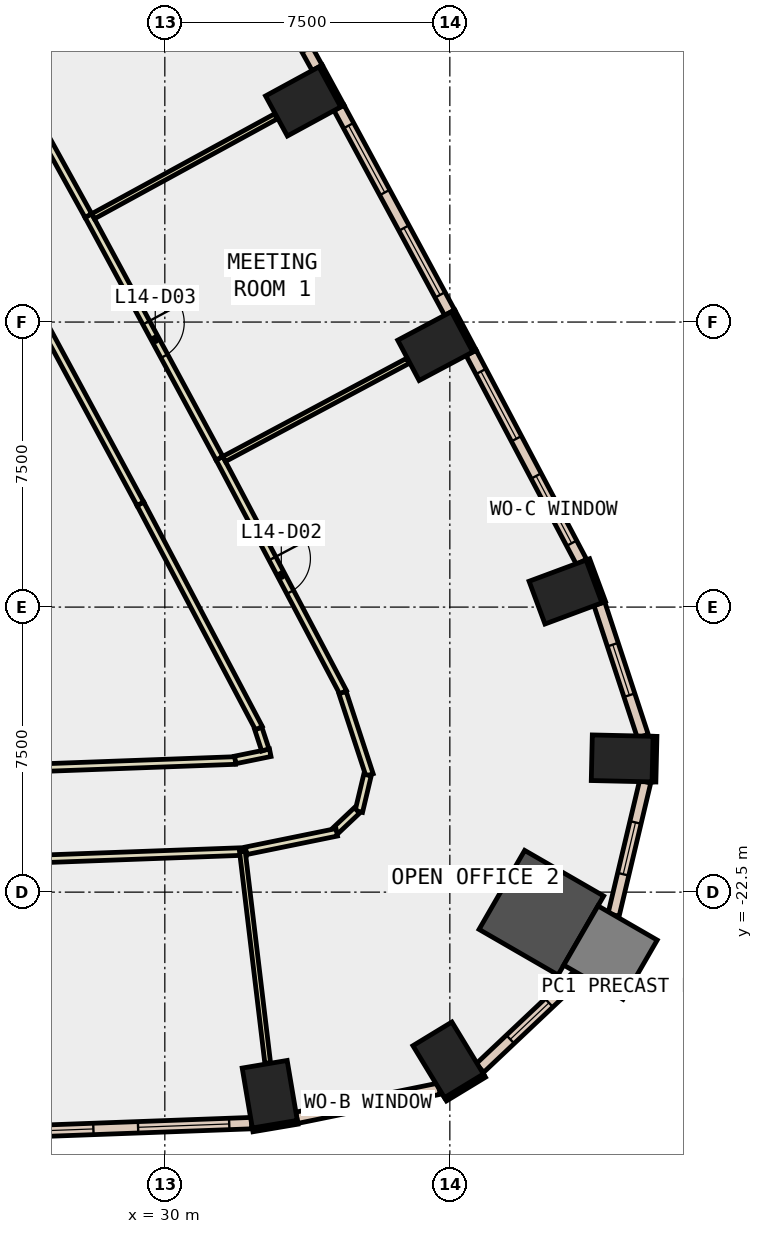
"""IFC4 building model, lengths in metres.
Left out: names, types, materials, properties, quantities, classifications, styles, units other than length and angle.
Written with IfcOpenShell. Run it as: python <this file> out.ifc"""

import sys

from ifc_helpers import new_model, si_unit, direction, frame, frame_2d, origin, origin_2d, place, context, subcontext, project, spatial, rectangle, extrude, element, fill, save


model = new_model("IFC4")
c1 = context("Model", 3, precision=1e-05, world=origin(), true_north=direction((0.0, 1.0)))
c2 = subcontext(c1, "Body", "Model", "MODEL_VIEW")
j1 = project(units=[si_unit("LENGTHUNIT", "METRE"), si_unit("PLANEANGLEUNIT", "RADIAN")], contexts=[c1])
p1 = place(None, origin())
s1 = spatial("IfcSite", under=j1, at=p1, CompositionType="ELEMENT")
p2 = place(p1, origin())
s2 = spatial("IfcBuilding", under=s1, at=p2, CompositionType="ELEMENT")
p3 = place(p2, frame((0.0, 0.0, 68.6)))
s3 = spatial("IfcBuildingStorey", under=s2, at=p3, CompositionType="ELEMENT", Elevation=68.6)
for number, where, z_axis, x_axis in (
    (1, (32.761, -27.818, -0.4), (0.0, 0.0, 1.0), (0.986, 0.167, 0.0)),
    (2, (37.457, -26.913, -0.4), (0.0, 0.0, 1.0), (0.855, 0.519, 0.0)),
):
    element("IfcColumn", number, at=place(p3, frame(where, z_axis=z_axis, x_axis=x_axis)), inside=s3, PredefinedType="COLUMN", context=c2, shape_type="SweptSolid", body=[
        extrude(rectangle(XDim=1.2, YDim=1.6, at=origin_2d()), origin(), (0.0, 0.0, 1.0), 4.2),
    ])
p4 = place(p3, frame((39.908, -23.041, -0.4), z_axis=(0.0, 0.0, 1.0), x_axis=(-0.866025403784, 0.5, 0.0)))
e3 = element("IfcColumn", 3, at=p4, inside=s3, PredefinedType="COLUMN", context=c2, shape_type="SweptSolid", body=[
    extrude(rectangle(XDim=2.4, YDim=2.4, at=origin_2d()), origin(), (0.0, 0.0, 1.0), 4.2),
])
for number, where, z_axis, x_axis in (
    (4, (42.035, -18.982, -0.4), (0.0, 0.0, 1.0), (0.023, 1.0, 0.0)),
    (5, (40.544, -14.604, -0.4), (0.0, 0.0, 1.0), (-0.348, 0.937, 0.0)),
    (6, (37.117, -8.132, -0.4), (0.0, 0.0, 1.0), (-0.469, 0.883, 0.0)),
    (7, (33.64, -1.695, -0.4), (0.0, 0.0, 1.0), (-0.478, 0.878, 0.0)),
):
    element("IfcColumn", number, at=place(p3, frame(where, z_axis=z_axis, x_axis=x_axis)), inside=s3, PredefinedType="COLUMN", context=c2, shape_type="SweptSolid", body=[
        extrude(rectangle(XDim=1.2, YDim=1.6, at=origin_2d()), origin(), (0.0, 0.0, 1.0), 4.2),
    ])
p5 = place(p3, frame((41.727, -24.091, -0.4), z_axis=(0.0, 0.0, 1.0), x_axis=(-0.866025403784, 0.5, 0.0)))
e8 = element("IfcColumn", 8, at=p5, inside=s3, PredefinedType="COLUMN", context=c2, shape_type="SweptSolid", body=[
    extrude(rectangle(XDim=1.8, YDim=1.8, at=origin_2d()), origin(), (0.0, 0.0, 1.0), 4.2),
])
p6 = place(p3, frame((41.55, -14.871, 0.0), z_axis=(0.0, 0.0, 1.0), x_axis=(-0.348268249601, 0.937394914814, 0.0)))
e9 = element("IfcWall", 9, at=p6, inside=s3, PredefinedType="STANDARD", context=c2, shape_type="SweptSolid", body=[
    extrude(rectangle(XDim=1.2, YDim=0.1, at=frame_2d((0.6, 0.0))), origin(), (0.0, 0.0, 1.0), 3.8),
])
p7 = place(p3, frame((38.149, -8.263, 0.0), z_axis=(0.0, 0.0, 1.0), x_axis=(-0.469467784567, 0.882949601763, 0.0)))
e10 = element("IfcWall", 10, at=p7, inside=s3, PredefinedType="STANDARD", context=c2, shape_type="SweptSolid", body=[
    extrude(rectangle(XDim=1.199, YDim=0.1, at=frame_2d((0.6, 0.0))), origin(), (0.0, 0.0, 1.0), 3.8),
])
p8 = place(p3, frame((34.673, -1.816, 0.0), z_axis=(0.0, 0.0, 1.0), x_axis=(-0.478267644701, 0.878214131082, 0.0)))
e11 = element("IfcWall", 11, at=p8, inside=s3, PredefinedType="STANDARD", context=c2, shape_type="SweptSolid", body=[
    extrude(rectangle(XDim=1.2, YDim=0.1, at=frame_2d((0.6, 0.0))), origin(), (0.0, 0.0, 1.0), 3.8),
])
p9 = place(p3, frame((32.311, -28.756, 0.0), z_axis=(0.0, 0.0, 1.0), x_axis=(0.98597830993, 0.166873522011, 0.0)))
e12 = element("IfcWall", 12, at=p9, inside=s3, PredefinedType="STANDARD", context=c2, shape_type="SweptSolid", body=[
    extrude(rectangle(XDim=1.2, YDim=0.1, at=frame_2d((0.6, 0.0))), origin(), (0.0, 0.0, 1.0), 3.8),
])
p10 = place(p3, frame((37.385, -27.951, 0.0), z_axis=(0.0, 0.0, 1.0), x_axis=(0.854716608594, 0.519094903649, 0.0)))
e13 = element("IfcWall", 13, at=p10, inside=s3, PredefinedType="STANDARD", context=c2, shape_type="SweptSolid", body=[
    extrude(rectangle(XDim=1.2, YDim=0.1, at=frame_2d((0.6, 0.0))), origin(), (0.0, 0.0, 1.0), 3.8),
])
p11 = place(p3, frame((42.871, -19.601, 0.0), z_axis=(0.0, 0.0, 1.0), x_axis=(0.023183352363, 0.999731229968, 0.0)))
e14 = element("IfcWall", 14, at=p11, inside=s3, PredefinedType="STANDARD", context=c2, shape_type="SweptSolid", body=[
    extrude(rectangle(XDim=1.2, YDim=0.1, at=frame_2d((0.6, 0.0))), origin(), (0.0, 0.0, 1.0), 3.8),
])
p12 = place(p3, frame((25.134, -28.841, 0.0), z_axis=(0.0, 0.0, 1.0), x_axis=(0.999322852286, 0.036794522671, 0.0)))
e15 = element("IfcWall", 15, at=p12, inside=s3, PredefinedType="STANDARD", context=c2, shape_type="SweptSolid", body=[
    extrude(rectangle(XDim=7.153, YDim=0.3, at=frame_2d((3.576, 0.0))), origin(), (0.0, 0.0, 1.0), 3.8),
])
p13 = place(p12, frame((0.588, 0.0, 0.9)))
e16 = element("IfcOpeningElement", 16, at=p13, cuts=e15, PredefinedType="OPENING", context=c2, shape_type="SweptSolid", body=[
    extrude(rectangle(XDim=2.4, YDim=2.6, at=frame_2d((1.2, 1.3))), frame((0.0, 0.16, 0.0), z_axis=(0.0, -1.0, 0.0), x_axis=(1.0, 0.0, 0.0)), (0.0, 0.0, 1.0), 0.32),
])
p14 = place(p12, frame((4.165, 0.0, 0.9)))
e17 = element("IfcOpeningElement", 17, at=p14, cuts=e15, PredefinedType="OPENING", context=c2, shape_type="SweptSolid", body=[
    extrude(rectangle(XDim=2.4, YDim=2.6, at=frame_2d((1.2, 1.3))), frame((0.0, 0.16, 0.0), z_axis=(0.0, -1.0, 0.0), x_axis=(1.0, 0.0, 0.0)), (0.0, 0.0, 1.0), 0.32),
])
p15 = place(p3, frame((33.473, -28.437, 0.0), z_axis=(0.0, 0.0, 1.0), x_axis=(0.979824229846, 0.199861148317, 0.0)))
e18 = element("IfcWall", 18, at=p15, inside=s3, PredefinedType="STANDARD", context=c2, shape_type="SweptSolid", body=[
    extrude(rectangle(XDim=3.822, YDim=0.3, at=frame_2d((1.911, 0.0))), origin(), (0.0, 0.0, 1.0), 3.8),
])
p16 = place(p15, frame((1.211, 0.0, 0.9)))
e19 = element("IfcOpeningElement", 19, at=p16, cuts=e18, PredefinedType="OPENING", context=c2, shape_type="SweptSolid", body=[
    extrude(rectangle(XDim=1.4, YDim=2.6, at=frame_2d((0.7, 1.3))), frame((0.0, 0.16, 0.0), z_axis=(0.0, -1.0, 0.0), x_axis=(1.0, 0.0, 0.0)), (0.0, 0.0, 1.0), 0.32),
])
p17 = place(p3, frame((38.29, -27.13, 0.0), z_axis=(0.0, 0.0, 1.0), x_axis=(0.727082698591, 0.686549888508, 0.0)))
e20 = element("IfcWall", 20, at=p17, inside=s3, PredefinedType="STANDARD", context=c2, shape_type="SweptSolid", body=[
    extrude(rectangle(XDim=3.602, YDim=0.3, at=frame_2d((1.801, 0.0))), origin(), (0.0, 0.0, 1.0), 3.8),
])
p18 = place(p17, frame((1.101, 0.0, 0.9)))
e21 = element("IfcOpeningElement", 21, at=p18, cuts=e20, PredefinedType="OPENING", context=c2, shape_type="SweptSolid", body=[
    extrude(rectangle(XDim=1.4, YDim=2.6, at=frame_2d((0.7, 1.3))), frame((0.0, 0.16, 0.0), z_axis=(0.0, -1.0, 0.0), x_axis=(1.0, 0.0, 0.0)), (0.0, 0.0, 1.0), 0.32),
])
p19 = place(p3, frame((41.808, -23.1, 0.0), z_axis=(0.0, 0.0, 1.0), x_axis=(0.230893603767, 0.972979004778, 0.0)))
e22 = element("IfcWall", 22, at=p19, inside=s3, PredefinedType="STANDARD", context=c2, shape_type="SweptSolid", body=[
    extrude(rectangle(XDim=3.603, YDim=0.3, at=frame_2d((1.801, 0.0))), origin(), (0.0, 0.0, 1.0), 3.8),
])
p20 = place(p19, frame((1.101, 0.0, 0.9)))
e23 = element("IfcOpeningElement", 23, at=p20, cuts=e22, PredefinedType="OPENING", context=c2, shape_type="SweptSolid", body=[
    extrude(rectangle(XDim=1.4, YDim=2.6, at=frame_2d((0.7, 1.3))), frame((0.0, 0.16, 0.0), z_axis=(0.0, -1.0, 0.0), x_axis=(1.0, 0.0, 0.0)), (0.0, 0.0, 1.0), 0.32),
])
p21 = place(p3, frame((42.578, -18.395, 0.0), z_axis=(0.0, 0.0, 1.0), x_axis=(-0.31208801137, 0.95005319491, 0.0)))
e24 = element("IfcWall", 24, at=p21, inside=s3, PredefinedType="STANDARD", context=c2, shape_type="SweptSolid", body=[
    extrude(rectangle(XDim=3.665, YDim=0.3, at=frame_2d((1.833, 0.0))), origin(), (0.0, 0.0, 1.0), 3.8),
])
p22 = place(p21, frame((1.133, 0.0, 0.9)))
e25 = element("IfcOpeningElement", 25, at=p22, cuts=e24, PredefinedType="OPENING", context=c2, shape_type="SweptSolid", body=[
    extrude(rectangle(XDim=1.4, YDim=2.6, at=frame_2d((0.7, 1.3))), frame((0.0, 0.16, 0.0), z_axis=(0.0, -1.0, 0.0), x_axis=(1.0, 0.0, 0.0)), (0.0, 0.0, 1.0), 0.32),
])
p23 = place(p3, frame((40.964, -13.81, 0.0), z_axis=(0.0, 0.0, 1.0), x_axis=(-0.467041710902, 0.884235285587, 0.0)))
e26 = element("IfcWall", 26, at=p23, inside=s3, PredefinedType="STANDARD", context=c2, shape_type="SweptSolid", body=[
    extrude(rectangle(XDim=6.22, YDim=0.3, at=frame_2d((3.11, 0.0))), origin(), (0.0, 0.0, 1.0), 3.8),
])
p24 = place(p23, frame((0.555, 0.0, 0.9)))
e27 = element("IfcOpeningElement", 27, at=p24, cuts=e26, PredefinedType="OPENING", context=c2, shape_type="SweptSolid", body=[
    extrude(rectangle(XDim=2.0, YDim=2.6, at=frame_2d((1.0, 1.3))), frame((0.0, 0.16, 0.0), z_axis=(0.0, -1.0, 0.0), x_axis=(1.0, 0.0, 0.0)), (0.0, 0.0, 1.0), 0.32),
])
p25 = place(p23, frame((3.665, 0.0, 0.9)))
e28 = element("IfcOpeningElement", 28, at=p25, cuts=e26, PredefinedType="OPENING", context=c2, shape_type="SweptSolid", body=[
    extrude(rectangle(XDim=2.0, YDim=2.6, at=frame_2d((1.0, 1.3))), frame((0.0, 0.16, 0.0), z_axis=(0.0, -1.0, 0.0), x_axis=(1.0, 0.0, 0.0)), (0.0, 0.0, 1.0), 0.32),
])
p26 = place(p3, frame((37.495, -7.253, 0.0), z_axis=(0.0, 0.0, 1.0), x_axis=(-0.475413659872, 0.879762383833, 0.0)))
e29 = element("IfcWall", 29, at=p26, inside=s3, PredefinedType="STANDARD", context=c2, shape_type="SweptSolid", body=[
    extrude(rectangle(XDim=6.125, YDim=0.3, at=frame_2d((3.063, 0.0))), origin(), (0.0, 0.0, 1.0), 3.8),
])
p27 = place(p26, frame((0.531, 0.0, 0.9)))
e30 = element("IfcOpeningElement", 30, at=p27, cuts=e29, PredefinedType="OPENING", context=c2, shape_type="SweptSolid", body=[
    extrude(rectangle(XDim=2.0, YDim=2.6, at=frame_2d((1.0, 1.3))), frame((0.0, 0.16, 0.0), z_axis=(0.0, -1.0, 0.0), x_axis=(1.0, 0.0, 0.0)), (0.0, 0.0, 1.0), 0.32),
])
p28 = place(p26, frame((3.594, 0.0, 0.9)))
e31 = element("IfcOpeningElement", 31, at=p28, cuts=e29, PredefinedType="OPENING", context=c2, shape_type="SweptSolid", body=[
    extrude(rectangle(XDim=2.0, YDim=2.6, at=frame_2d((1.0, 1.3))), frame((0.0, 0.16, 0.0), z_axis=(0.0, -1.0, 0.0), x_axis=(1.0, 0.0, 0.0)), (0.0, 0.0, 1.0), 0.32),
])
p29 = place(p3, frame((34.009, -0.812, 0.0), z_axis=(0.0, 0.0, 1.0), x_axis=(-0.483587271547, 0.875296150339, 0.0)))
e32 = element("IfcWall", 32, at=p29, inside=s3, PredefinedType="STANDARD", context=c2, shape_type="SweptSolid", body=[
    extrude(rectangle(XDim=6.125, YDim=0.3, at=frame_2d((3.062, 0.0))), origin(), (0.0, 0.0, 1.0), 3.8),
])
p30 = place(p29, frame((0.531, 0.0, 0.9)))
e33 = element("IfcOpeningElement", 33, at=p30, cuts=e32, PredefinedType="OPENING", context=c2, shape_type="SweptSolid", body=[
    extrude(rectangle(XDim=2.0, YDim=2.6, at=frame_2d((1.0, 1.3))), frame((0.0, 0.16, 0.0), z_axis=(0.0, -1.0, 0.0), x_axis=(1.0, 0.0, 0.0)), (0.0, 0.0, 1.0), 0.32),
])
p31 = place(p29, frame((3.594, 0.0, 0.9)))
e34 = element("IfcOpeningElement", 34, at=p31, cuts=e32, PredefinedType="OPENING", context=c2, shape_type="SweptSolid", body=[
    extrude(rectangle(XDim=2.0, YDim=2.6, at=frame_2d((1.0, 1.3))), frame((0.0, 0.16, 0.0), z_axis=(0.0, -1.0, 0.0), x_axis=(1.0, 0.0, 0.0)), (0.0, 0.0, 1.0), 0.32),
])
p32 = place(p3, frame((24.235, -19.318, 0.0), z_axis=(0.0, 0.0, 1.0), x_axis=(0.999320698485, 0.036852972476, 0.0)))
e35 = element("IfcWall", 35, at=p32, inside=s3, PredefinedType="PARTITIONING", context=c2, shape_type="SweptSolid", body=[
    extrude(rectangle(XDim=7.625, YDim=0.2, at=frame_2d((3.812, 0.0))), origin(), (0.0, 0.0, 1.0), 3.8),
])
p33 = place(p3, frame((31.853, -19.021, 0.0), z_axis=(0.0, 0.0, 1.0), x_axis=(0.979793671436, 0.200010903236, 0.0)))
e36 = element("IfcWall", 36, at=p33, inside=s3, PredefinedType="PARTITIONING", context=c2, shape_type="SweptSolid", body=[
    extrude(rectangle(XDim=0.94, YDim=0.2, at=frame_2d((0.47, 0.0))), origin(), (0.0, 0.0, 1.0), 3.8),
])
p34 = place(p3, frame((32.645, -18.758, 0.0), z_axis=(0.0, 0.0, 1.0), x_axis=(-0.311683867653, 0.950185859001, 0.0)))
e37 = element("IfcWall", 37, at=p34, inside=s3, PredefinedType="PARTITIONING", context=c2, shape_type="SweptSolid", body=[
    extrude(rectangle(XDim=0.597, YDim=0.2, at=frame_2d((0.298, 0.0))), origin(), (0.0, 0.0, 1.0), 3.8),
])
p35 = place(p3, frame((32.475, -18.185, 0.0), z_axis=(0.0, 0.0, 1.0), x_axis=(-0.467123190417, 0.884192244353, 0.0)))
e38 = element("IfcWall", 38, at=p35, inside=s3, PredefinedType="PARTITIONING", context=c2, shape_type="SweptSolid", body=[
    extrude(rectangle(XDim=6.677, YDim=0.2, at=frame_2d((3.339, 0.0))), origin(), (0.0, 0.0, 1.0), 3.8),
])
p36 = place(p3, frame((29.356, -12.281, 0.0), z_axis=(0.0, 0.0, 1.0), x_axis=(-0.475244544503, 0.87985375087, 0.0)))
e39 = element("IfcWall", 39, at=p36, inside=s3, PredefinedType="PARTITIONING", context=c2, shape_type="SweptSolid", body=[
    extrude(rectangle(XDim=7.234, YDim=0.2, at=frame_2d((3.617, 0.0))), origin(), (0.0, 0.0, 1.0), 3.8),
])
p37 = place(p3, frame((32.141, -21.428, 0.0), z_axis=(0.0, 0.0, 1.0), x_axis=(-0.999324021202, -0.036762761723, 0.0)))
e40 = element("IfcWall", 40, at=p37, inside=s3, PredefinedType="PARTITIONING", context=c2, shape_type="SweptSolid", body=[
    extrude(rectangle(XDim=7.836, YDim=0.2, at=frame_2d((3.918, 0.0))), origin(), (0.0, 0.0, 1.0), 3.8),
])
p38 = place(p3, frame((31.438, -11.083, 0.0), z_axis=(0.0, 0.0, 1.0), x_axis=(0.467077609314, -0.884216323575, 0.0)))
e41 = element("IfcWall", 41, at=p38, inside=s3, PredefinedType="PARTITIONING", context=c2, shape_type="SweptSolid", body=[
    extrude(rectangle(XDim=6.967, YDim=0.2, at=frame_2d((3.483, 0.0))), origin(), (0.0, 0.0, 1.0), 3.8),
])
p39 = place(p38, frame((2.983, 0.0, 0.0)))
e42 = element("IfcOpeningElement", 42, at=p39, cuts=e41, PredefinedType="OPENING", context=c2, shape_type="SweptSolid", body=[
    extrude(rectangle(XDim=1.0, YDim=2.1, at=frame_2d((0.5, 1.05))), frame((0.0, 0.11, 0.0), z_axis=(0.0, -1.0, 0.0), x_axis=(1.0, 0.0, 0.0)), (0.0, 0.0, 1.0), 0.22),
])
p40 = place(p3, frame((34.676, -17.25, 0.0), z_axis=(0.0, 0.0, 1.0), x_axis=(0.311855014756, -0.950129701552, 0.0)))
e43 = element("IfcWall", 43, at=p40, inside=s3, PredefinedType="PARTITIONING", context=c2, shape_type="SweptSolid", body=[
    extrude(rectangle(XDim=2.28, YDim=0.2, at=frame_2d((1.14, 0.0))), origin(), (0.0, 0.0, 1.0), 3.8),
])
p41 = place(p3, frame((35.333, -19.419, 0.0), z_axis=(0.0, 0.0, 1.0), x_axis=(-0.231107564644, -0.97292820576, 0.0)))
e44 = element("IfcWall", 44, at=p41, inside=s3, PredefinedType="PARTITIONING", context=c2, shape_type="SweptSolid", body=[
    extrude(rectangle(XDim=0.987, YDim=0.2, at=frame_2d((0.493, 0.0))), origin(), (0.0, 0.0, 1.0), 3.8),
])
p42 = place(p3, frame((35.056, -20.35, 0.0), z_axis=(0.0, 0.0, 1.0), x_axis=(-0.72702197617, -0.686614190186, 0.0)))
e45 = element("IfcWall", 45, at=p42, inside=s3, PredefinedType="PARTITIONING", context=c2, shape_type="SweptSolid", body=[
    extrude(rectangle(XDim=0.767, YDim=0.2, at=frame_2d((0.384, 0.0))), origin(), (0.0, 0.0, 1.0), 3.8),
])
p43 = place(p3, frame((34.523, -20.926, 0.0), z_axis=(0.0, 0.0, 1.0), x_axis=(-0.979840552367, -0.199781110063, 0.0)))
e46 = element("IfcWall", 46, at=p43, inside=s3, PredefinedType="PARTITIONING", context=c2, shape_type="SweptSolid", body=[
    extrude(rectangle(XDim=2.433, YDim=0.2, at=frame_2d((1.217, 0.0))), origin(), (0.0, 0.0, 1.0), 3.8),
])
p44 = place(p3, frame((27.988, -4.699, 0.0), z_axis=(0.0, 0.0, 1.0), x_axis=(0.475319272717, -0.879813383044, 0.0)))
e47 = element("IfcWall", 47, at=p44, inside=s3, PredefinedType="PARTITIONING", context=c2, shape_type="SweptSolid", body=[
    extrude(rectangle(XDim=7.256, YDim=0.2, at=frame_2d((3.628, 0.0))), origin(), (0.0, 0.0, 1.0), 3.8),
])
p45 = place(p44, frame((3.203, 0.0, 0.0)))
e48 = element("IfcOpeningElement", 48, at=p45, cuts=e47, PredefinedType="OPENING", context=c2, shape_type="SweptSolid", body=[
    extrude(rectangle(XDim=1.0, YDim=2.1, at=frame_2d((0.5, 1.05))), frame((0.0, 0.11, 0.0), z_axis=(0.0, -1.0, 0.0), x_axis=(1.0, 0.0, 0.0)), (0.0, 0.0, 1.0), 0.22),
])
p46 = place(p3, frame((24.515, 1.585, 0.0), z_axis=(0.0, 0.0, 1.0), x_axis=(0.483629211989, -0.875272977597, 0.0)))
e49 = element("IfcWall", 49, at=p46, inside=s3, PredefinedType="PARTITIONING", context=c2, shape_type="SweptSolid", body=[
    extrude(rectangle(XDim=7.179, YDim=0.2, at=frame_2d((3.59, 0.0))), origin(), (0.0, 0.0, 1.0), 3.8),
])
p47 = place(p3, frame((32.041, -21.432, 0.0), z_axis=(0.0, 0.0, 1.0), x_axis=(0.118848018273, -0.992912457648, 0.0)))
e50 = element("IfcWall", 50, at=p47, inside=s3, PredefinedType="PARTITIONING", context=c2, shape_type="SweptSolid", body=[
    extrude(rectangle(XDim=5.604, YDim=0.15, at=frame_2d((2.802, 0.0))), origin(), (0.0, 0.0, 1.0), 3.8),
])
p48 = place(p3, frame((31.561, -11.103, 0.0), z_axis=(0.0, 0.0, 1.0), x_axis=(0.882056805494, 0.47114306944, 0.0)))
e51 = element("IfcWall", 51, at=p48, inside=s3, PredefinedType="PARTITIONING", context=c2, shape_type="SweptSolid", body=[
    extrude(rectangle(XDim=5.48, YDim=0.15, at=frame_2d((2.74, 0.0))), origin(), (0.0, 0.0, 1.0), 3.8),
])
p49 = place(p3, frame((28.111, -4.717, 0.0), z_axis=(0.0, 0.0, 1.0), x_axis=(0.877558297547, 0.479469951515, 0.0)))
e52 = element("IfcWall", 52, at=p49, inside=s3, PredefinedType="PARTITIONING", context=c2, shape_type="SweptSolid", body=[
    extrude(rectangle(XDim=5.481, YDim=0.15, at=frame_2d((2.74, 0.0))), origin(), (0.0, 0.0, 1.0), 3.8),
])
p50 = place(p13, origin())
e53 = element("IfcWindow", 53, at=p50, inside=s3, PartitioningType="SINGLE_PANEL", PredefinedType="WINDOW", context=c2, shape_type="SweptSolid", body=[
    extrude(rectangle(XDim=2.4, YDim=2.6, at=frame_2d((1.2, 1.3))), frame((0.0, 0.03, 0.0), z_axis=(0.0, -1.0, 0.0), x_axis=(1.0, 0.0, 0.0)), (0.0, 0.0, 1.0), 0.06),
])
fill(e16, e53)
p51 = place(p14, origin())
e54 = element("IfcWindow", 54, at=p51, inside=s3, PartitioningType="SINGLE_PANEL", PredefinedType="WINDOW", context=c2, shape_type="SweptSolid", body=[
    extrude(rectangle(XDim=2.4, YDim=2.6, at=frame_2d((1.2, 1.3))), frame((0.0, 0.03, 0.0), z_axis=(0.0, -1.0, 0.0), x_axis=(1.0, 0.0, 0.0)), (0.0, 0.0, 1.0), 0.06),
])
fill(e17, e54)
p52 = place(p16, origin())
e55 = element("IfcWindow", 55, at=p52, inside=s3, PartitioningType="SINGLE_PANEL", PredefinedType="WINDOW", context=c2, shape_type="SweptSolid", body=[
    extrude(rectangle(XDim=1.4, YDim=2.6, at=frame_2d((0.7, 1.3))), frame((0.0, 0.03, 0.0), z_axis=(0.0, -1.0, 0.0), x_axis=(1.0, 0.0, 0.0)), (0.0, 0.0, 1.0), 0.06),
])
fill(e19, e55)
p53 = place(p18, origin())
e56 = element("IfcWindow", 56, at=p53, inside=s3, PartitioningType="SINGLE_PANEL", PredefinedType="WINDOW", context=c2, shape_type="SweptSolid", body=[
    extrude(rectangle(XDim=1.4, YDim=2.6, at=frame_2d((0.7, 1.3))), frame((0.0, 0.03, 0.0), z_axis=(0.0, -1.0, 0.0), x_axis=(1.0, 0.0, 0.0)), (0.0, 0.0, 1.0), 0.06),
])
fill(e21, e56)
p54 = place(p20, origin())
e57 = element("IfcWindow", 57, at=p54, inside=s3, PartitioningType="SINGLE_PANEL", PredefinedType="WINDOW", context=c2, shape_type="SweptSolid", body=[
    extrude(rectangle(XDim=1.4, YDim=2.6, at=frame_2d((0.7, 1.3))), frame((0.0, 0.03, 0.0), z_axis=(0.0, -1.0, 0.0), x_axis=(1.0, 0.0, 0.0)), (0.0, 0.0, 1.0), 0.06),
])
fill(e23, e57)
p55 = place(p22, origin())
e58 = element("IfcWindow", 58, at=p55, inside=s3, PartitioningType="SINGLE_PANEL", PredefinedType="WINDOW", context=c2, shape_type="SweptSolid", body=[
    extrude(rectangle(XDim=1.4, YDim=2.6, at=frame_2d((0.7, 1.3))), frame((0.0, 0.03, 0.0), z_axis=(0.0, -1.0, 0.0), x_axis=(1.0, 0.0, 0.0)), (0.0, 0.0, 1.0), 0.06),
])
fill(e25, e58)
p56 = place(p24, origin())
e59 = element("IfcWindow", 59, at=p56, inside=s3, PartitioningType="SINGLE_PANEL", PredefinedType="WINDOW", context=c2, shape_type="SweptSolid", body=[
    extrude(rectangle(XDim=2.0, YDim=2.6, at=frame_2d((1.0, 1.3))), frame((0.0, 0.03, 0.0), z_axis=(0.0, -1.0, 0.0), x_axis=(1.0, 0.0, 0.0)), (0.0, 0.0, 1.0), 0.06),
])
fill(e27, e59)
p57 = place(p25, origin())
e60 = element("IfcWindow", 60, at=p57, inside=s3, PartitioningType="SINGLE_PANEL", PredefinedType="WINDOW", context=c2, shape_type="SweptSolid", body=[
    extrude(rectangle(XDim=2.0, YDim=2.6, at=frame_2d((1.0, 1.3))), frame((0.0, 0.03, 0.0), z_axis=(0.0, -1.0, 0.0), x_axis=(1.0, 0.0, 0.0)), (0.0, 0.0, 1.0), 0.06),
])
fill(e28, e60)
p58 = place(p27, origin())
e61 = element("IfcWindow", 61, at=p58, inside=s3, PartitioningType="SINGLE_PANEL", PredefinedType="WINDOW", context=c2, shape_type="SweptSolid", body=[
    extrude(rectangle(XDim=2.0, YDim=2.6, at=frame_2d((1.0, 1.3))), frame((0.0, 0.03, 0.0), z_axis=(0.0, -1.0, 0.0), x_axis=(1.0, 0.0, 0.0)), (0.0, 0.0, 1.0), 0.06),
])
fill(e30, e61)
p59 = place(p28, origin())
e62 = element("IfcWindow", 62, at=p59, inside=s3, PartitioningType="SINGLE_PANEL", PredefinedType="WINDOW", context=c2, shape_type="SweptSolid", body=[
    extrude(rectangle(XDim=2.0, YDim=2.6, at=frame_2d((1.0, 1.3))), frame((0.0, 0.03, 0.0), z_axis=(0.0, -1.0, 0.0), x_axis=(1.0, 0.0, 0.0)), (0.0, 0.0, 1.0), 0.06),
])
fill(e31, e62)
p60 = place(p39, origin())
e63 = element("IfcDoor", 63, at=p60, inside=s3, OperationType="SINGLE_SWING_LEFT", PredefinedType="DOOR", context=c2, shape_type="SweptSolid", body=[
    extrude(rectangle(XDim=1.0, YDim=2.1, at=frame_2d((0.5, 1.05))), frame((0.0, 0.025, 0.0), z_axis=(0.0, -1.0, 0.0), x_axis=(1.0, 0.0, 0.0)), (0.0, 0.0, 1.0), 0.05),
])
fill(e42, e63)
p61 = place(p45, origin())
e64 = element("IfcDoor", 64, at=p61, inside=s3, OperationType="SINGLE_SWING_RIGHT", PredefinedType="DOOR", context=c2, shape_type="SweptSolid", body=[
    extrude(rectangle(XDim=1.0, YDim=2.1, at=frame_2d((0.5, 1.05))), frame((0.0, 0.025, 0.0), z_axis=(0.0, -1.0, 0.0), x_axis=(1.0, 0.0, 0.0)), (0.0, 0.0, 1.0), 0.05),
])
fill(e48, e64)
save(model, sys.argv[1])
